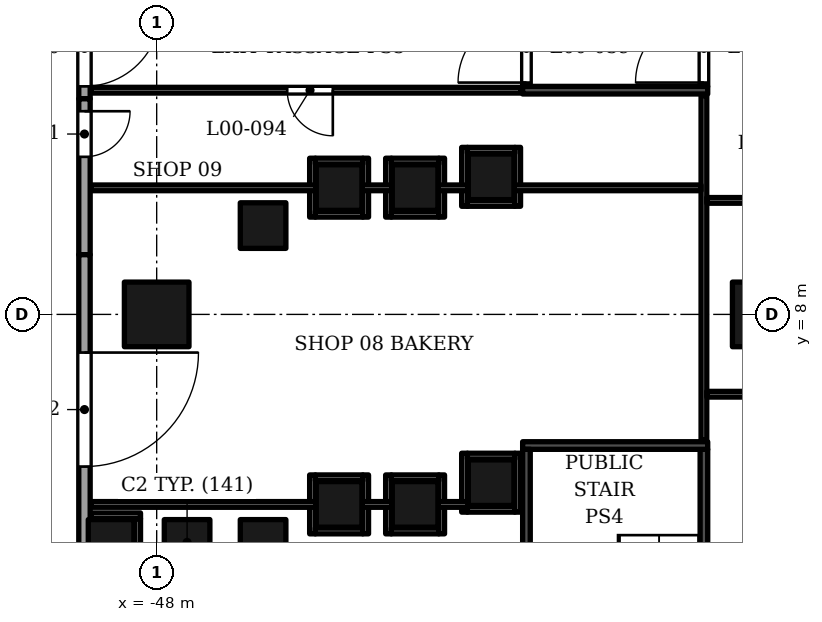
"""IFC4 building model, lengths in metres.
Left out: names, types, materials, properties, quantities, classifications, styles, units other than length and angle.
Written with IfcOpenShell. Run it as: python <this file> out.ifc"""

import sys

from ifc_helpers import new_model, si_unit, direction, frame, frame_2d, origin, origin_2d, place, context, subcontext, project, spatial, rectangle, extrude, element, fill, save


model = new_model("IFC4")
c1 = context("Model", 3, precision=1e-05, world=origin(), true_north=direction((0.0, 1.0)))
c2 = subcontext(c1, "Body", "Model", "MODEL_VIEW")
j1 = project(units=[si_unit("LENGTHUNIT", "METRE"), si_unit("PLANEANGLEUNIT", "RADIAN")], contexts=[c1])
p1 = place(None, origin())
s1 = spatial("IfcSite", under=j1, at=p1, CompositionType="ELEMENT")
p2 = place(p1, origin())
s2 = spatial("IfcBuilding", under=s1, at=p2, CompositionType="ELEMENT")
p3 = place(p2, origin())
s3 = spatial("IfcBuildingStorey", under=s2, at=p3, CompositionType="ELEMENT", Elevation=0.0)
for number, where, z_axis, x_axis in (
    (1, (-48.0, 8.0, 0.0), (0.0, 0.0, 1.0), (1.0, 0.0, 0.0)),
    (2, (-32.0, 8.0, 0.0), (0.0, 0.0, 1.0), (1.0, 0.0, 0.0)),
):
    element("IfcColumn", number, at=place(p3, frame(where, z_axis=z_axis, x_axis=x_axis)), inside=s3, PredefinedType="COLUMN", context=c2, shape_type="SweptSolid", body=[
        extrude(rectangle(XDim=1.7, YDim=1.7, at=origin_2d()), origin(), (0.0, 0.0, 1.0), 9.0),
    ])
for number, where, z_axis, x_axis in (
    (3, (-39.2, 3.572, 0.0), (0.0, 0.0, 1.0), (1.0, 0.0, 0.0)),
    (4, (-39.2, 11.62, 0.0), (0.0, 0.0, 1.0), (1.0, 0.0, 0.0)),
    (5, (-41.2, 3.001, 0.0), (0.0, 0.0, 1.0), (1.0, 0.0, 0.0)),
    (6, (-41.2, 11.337, 0.0), (0.0, 0.0, 1.0), (1.0, 0.0, 0.0)),
    (7, (-43.2, 3.001, 0.0), (0.0, 0.0, 1.0), (1.0, 0.0, 0.0)),
    (8, (-43.2, 11.337, 0.0), (0.0, 0.0, 1.0), (1.0, 0.0, 0.0)),
    (9, (-45.2, 2.001, 0.0), (0.0, 0.0, 1.0), (1.0, 0.0, 0.0)),
    (10, (-45.2, 10.337, 0.0), (0.0, 0.0, 1.0), (1.0, 0.0, 0.0)),
    (11, (-47.2, 2.001, 0.0), (0.0, 0.0, 1.0), (1.0, 0.0, 0.0)),
    (12, (-49.2, 2.001, 0.0), (0.0, 0.0, 1.0), (1.0, 0.0, 0.0)),
):
    element("IfcColumn", number, at=place(p3, frame(where, z_axis=z_axis, x_axis=x_axis)), inside=s3, PredefinedType="COLUMN", context=c2, shape_type="SweptSolid", body=[
        extrude(rectangle(XDim=1.2, YDim=1.2, at=origin_2d()), origin(), (0.0, 0.0, 1.0), 9.0),
    ])
p4 = place(p3, frame((-49.9, 16.4, 0.0), z_axis=(0.0, 0.0, 1.0), x_axis=(0.0, -1.0, 0.0)))
e13 = element("IfcWall", 13, at=p4, inside=s3, PredefinedType="ELEMENTEDWALL", context=c2, shape_type="SweptSolid", body=[
    extrude(rectangle(XDim=2.727, YDim=0.3, at=frame_2d((1.363, 0.0))), origin(), (0.0, 0.0, 1.0), 7.6),
])
p5 = place(p4, frame((0.4, 0.0, 0.0)))
e14 = element("IfcOpeningElement", 14, at=p5, cuts=e13, PredefinedType="OPENING", context=c2, shape_type="SweptSolid", body=[
    extrude(rectangle(XDim=2.0, YDim=2.4, at=frame_2d((1.0, 1.2))), frame((0.0, 0.16, 0.0), z_axis=(0.0, -1.0, 0.0), x_axis=(1.0, 0.0, 0.0)), (0.0, 0.0, 1.0), 0.32),
])
p6 = place(p3, frame((-49.9, 13.673, 0.0), z_axis=(0.0, 0.0, 1.0), x_axis=(0.0, -1.0, 0.0)))
e15 = element("IfcWall", 15, at=p6, inside=s3, PredefinedType="ELEMENTEDWALL", context=c2, shape_type="SweptSolid", body=[
    extrude(rectangle(XDim=4.102, YDim=0.3, at=frame_2d((2.051, 0.0))), origin(), (0.0, 0.0, 1.0), 7.6),
])
p7 = place(p6, frame((0.327, 0.0, 0.0)))
e16 = element("IfcOpeningElement", 16, at=p7, cuts=e15, PredefinedType="OPENING", context=c2, shape_type="SweptSolid", body=[
    extrude(rectangle(XDim=1.2, YDim=2.7, at=frame_2d((0.6, 1.35))), frame((0.0, 0.16, 0.0), z_axis=(0.0, -1.0, 0.0), x_axis=(1.0, 0.0, 0.0)), (0.0, 0.0, 1.0), 0.32),
])
p8 = place(p3, frame((-49.9, 9.571, 0.0), z_axis=(0.0, 0.0, 1.0), x_axis=(0.0, -1.0, 0.0)))
e17 = element("IfcWall", 17, at=p8, inside=s3, PredefinedType="ELEMENTEDWALL", context=c2, shape_type="SweptSolid", body=[
    extrude(rectangle(XDim=7.673, YDim=0.3, at=frame_2d((3.836, 0.0))), origin(), (0.0, 0.0, 1.0), 7.6),
])
p9 = place(p8, frame((2.575, 0.0, 0.0)))
e18 = element("IfcOpeningElement", 18, at=p9, cuts=e17, PredefinedType="OPENING", context=c2, shape_type="SweptSolid", body=[
    extrude(rectangle(XDim=3.0, YDim=2.7, at=frame_2d((1.5, 1.35))), frame((0.0, 0.16, 0.0), z_axis=(0.0, -1.0, 0.0), x_axis=(1.0, 0.0, 0.0)), (0.0, 0.0, 1.0), 0.32),
])
for number, where, z_axis, x_axis in (
    (19, (-49.85, 18.79, 9.0), (0.0, 0.0, 1.0), (0.0, -1.0, 0.0)),
    (20, (-49.85, 4.093, 9.0), (0.0, 0.0, 1.0), (0.0, -1.0, 0.0)),
):
    element("IfcWall", number, at=place(p3, frame(where, z_axis=z_axis, x_axis=x_axis)), inside=s3, PredefinedType="PARAPET", context=c2, shape_type="SweptSolid", body=[
        extrude(rectangle(XDim=14.698, YDim=0.3, at=frame_2d((7.349, 0.0))), origin(), (0.0, 0.0, 1.0), 1.1),
    ])
p10 = place(p3, frame((-38.37, 4.55, 0.0), z_axis=(0.0, 0.0, 1.0), x_axis=(1.0, 0.0, 0.0)))
e21 = element("IfcWall", 21, at=p10, inside=s3, PredefinedType="SOLIDWALL", context=c2, shape_type="SweptSolid", body=[
    extrude(rectangle(XDim=4.87, YDim=0.2, at=frame_2d((2.435, 0.0))), origin(), (0.0, 0.0, 1.0), 8.5),
])
p11 = place(p3, frame((-38.27, -2.2, 0.0), z_axis=(0.0, 0.0, 1.0), x_axis=(0.0, 1.0, 0.0)))
e22 = element("IfcWall", 22, at=p11, inside=s3, PredefinedType="SOLIDWALL", context=c2, shape_type="SweptSolid", body=[
    extrude(rectangle(XDim=6.65, YDim=0.2, at=frame_2d((3.325, 0.0))), origin(), (0.0, 0.0, 1.0), 8.5),
])
p12 = place(p11, frame((0.1, 0.0, 0.0)))
e23 = element("IfcOpeningElement", 23, at=p12, cuts=e22, PredefinedType="OPENING", context=c2, shape_type="SweptSolid", body=[
    extrude(rectangle(XDim=1.8, YDim=2.4, at=frame_2d((0.9, 1.2))), frame((0.0, 0.11, 0.0), z_axis=(0.0, -1.0, 0.0), x_axis=(1.0, 0.0, 0.0)), (0.0, 0.0, 1.0), 0.22),
])
p13 = place(p3, frame((-33.6, -2.2, 0.0), z_axis=(0.0, 0.0, 1.0), x_axis=(0.0, 1.0, 0.0)))
e24 = element("IfcWall", 24, at=p13, inside=s3, PredefinedType="SOLIDWALL", context=c2, shape_type="SweptSolid", body=[
    extrude(rectangle(XDim=6.65, YDim=0.2, at=frame_2d((3.325, 0.0))), origin(), (0.0, 0.0, 1.0), 8.5),
])
p14 = place(p13, frame((0.1, 0.0, 0.0)))
e25 = element("IfcOpeningElement", 25, at=p14, cuts=e24, PredefinedType="OPENING", context=c2, shape_type="SweptSolid", body=[
    extrude(rectangle(XDim=1.8, YDim=2.4, at=frame_2d((0.9, 1.2))), frame((0.0, 0.11, 0.0), z_axis=(0.0, -1.0, 0.0), x_axis=(1.0, 0.0, 0.0)), (0.0, 0.0, 1.0), 0.22),
])
p15 = place(p3, frame((-38.37, 13.9, 0.0), z_axis=(0.0, 0.0, 1.0), x_axis=(1.0, 0.0, 0.0)))
e26 = element("IfcWall", 26, at=p15, inside=s3, PredefinedType="SOLIDWALL", context=c2, shape_type="SweptSolid", body=[
    extrude(rectangle(XDim=4.87, YDim=0.2, at=frame_2d((2.435, 0.0))), origin(), (0.0, 0.0, 1.0), 8.5),
])
p16 = place(p3, frame((-38.27, 14.0, 0.0), z_axis=(0.0, 0.0, 1.0), x_axis=(0.0, 1.0, 0.0)))
e27 = element("IfcWall", 27, at=p16, inside=s3, PredefinedType="SOLIDWALL", context=c2, shape_type="SweptSolid", body=[
    extrude(rectangle(XDim=6.65, YDim=0.2, at=frame_2d((3.325, 0.0))), origin(), (0.0, 0.0, 1.0), 8.5),
])
p17 = place(p16, frame((0.1, 0.0, 0.0)))
e28 = element("IfcOpeningElement", 28, at=p17, cuts=e27, PredefinedType="OPENING", context=c2, shape_type="SweptSolid", body=[
    extrude(rectangle(XDim=1.8, YDim=2.4, at=frame_2d((0.9, 1.2))), frame((0.0, 0.11, 0.0), z_axis=(0.0, -1.0, 0.0), x_axis=(1.0, 0.0, 0.0)), (0.0, 0.0, 1.0), 0.22),
])
p18 = place(p3, frame((-33.6, 14.0, 0.0), z_axis=(0.0, 0.0, 1.0), x_axis=(0.0, 1.0, 0.0)))
e29 = element("IfcWall", 29, at=p18, inside=s3, PredefinedType="SOLIDWALL", context=c2, shape_type="SweptSolid", body=[
    extrude(rectangle(XDim=6.65, YDim=0.2, at=frame_2d((3.325, 0.0))), origin(), (0.0, 0.0, 1.0), 8.5),
])
p19 = place(p18, frame((0.1, 0.0, 0.0)))
e30 = element("IfcOpeningElement", 30, at=p19, cuts=e29, PredefinedType="OPENING", context=c2, shape_type="SweptSolid", body=[
    extrude(rectangle(XDim=1.8, YDim=2.4, at=frame_2d((0.9, 1.2))), frame((0.0, 0.11, 0.0), z_axis=(0.0, -1.0, 0.0), x_axis=(1.0, 0.0, 0.0)), (0.0, 0.0, 1.0), 0.22),
])
p20 = place(p3, frame((-48.5, 1.376, 0.0), z_axis=(0.0, 0.0, 1.0), x_axis=(0.0, 1.0, 0.0)))
e31 = element("IfcWall", 31, at=p20, inside=s3, PredefinedType="PARTITIONING", context=c2, shape_type="SweptSolid", body=[
    extrude(rectangle(XDim=1.25, YDim=0.15, at=frame_2d((0.625, 0.0))), origin(), (0.0, 0.0, 1.0), 8.5),
])
p21 = place(p3, frame((-43.9, 2.226, 0.0), z_axis=(0.0, 0.0, 1.0), x_axis=(0.0, 1.0, 0.0)))
e32 = element("IfcWall", 32, at=p21, inside=s3, PredefinedType="PARTITIONING", context=c2, shape_type="SweptSolid", body=[
    extrude(rectangle(XDim=1.55, YDim=0.15, at=frame_2d((0.775, 0.0))), origin(), (0.0, 0.0, 1.0), 8.5),
])
p22 = place(p3, frame((-43.825, 2.301, 0.0), z_axis=(0.0, 0.0, 1.0), x_axis=(1.0, 0.0, 0.0)))
e33 = element("IfcWall", 33, at=p22, inside=s3, PredefinedType="PARTITIONING", context=c2, shape_type="SweptSolid", body=[
    extrude(rectangle(XDim=1.25, YDim=0.15, at=frame_2d((0.625, 0.0))), origin(), (0.0, 0.0, 1.0), 8.5),
])
for number, where, z_axis, x_axis in (
    (34, (-42.5, 2.226, 0.0), (0.0, 0.0, 1.0), (0.0, 1.0, 0.0)),
    (35, (-41.9, 2.226, 0.0), (0.0, 0.0, 1.0), (0.0, 1.0, 0.0)),
):
    element("IfcWall", number, at=place(p3, frame(where, z_axis=z_axis, x_axis=x_axis)), inside=s3, PredefinedType="PARTITIONING", context=c2, shape_type="SweptSolid", body=[
        extrude(rectangle(XDim=1.55, YDim=0.15, at=frame_2d((0.775, 0.0))), origin(), (0.0, 0.0, 1.0), 8.5),
    ])
p23 = place(p3, frame((-41.825, 2.301, 0.0), z_axis=(0.0, 0.0, 1.0), x_axis=(1.0, 0.0, 0.0)))
e36 = element("IfcWall", 36, at=p23, inside=s3, PredefinedType="PARTITIONING", context=c2, shape_type="SweptSolid", body=[
    extrude(rectangle(XDim=1.25, YDim=0.15, at=frame_2d((0.625, 0.0))), origin(), (0.0, 0.0, 1.0), 8.5),
])
p24 = place(p3, frame((-40.5, 2.226, 0.0), z_axis=(0.0, 0.0, 1.0), x_axis=(0.0, 1.0, 0.0)))
e37 = element("IfcWall", 37, at=p24, inside=s3, PredefinedType="PARTITIONING", context=c2, shape_type="SweptSolid", body=[
    extrude(rectangle(XDim=1.55, YDim=0.15, at=frame_2d((0.775, 0.0))), origin(), (0.0, 0.0, 1.0), 8.5),
])
p25 = place(p3, frame((-49.72, 2.701, 0.0), z_axis=(0.0, 0.0, 1.0), x_axis=(1.0, 0.0, 0.0)))
e38 = element("IfcWall", 38, at=p25, inside=s3, PredefinedType="PARTITIONING", context=c2, shape_type="SweptSolid", body=[
    extrude(rectangle(XDim=1.295, YDim=0.15, at=frame_2d((0.647, 0.0))), origin(), (0.0, 0.0, 1.0), 8.5),
])
p26 = place(p3, frame((-39.9, 2.797, 0.0), z_axis=(0.0, 0.0, 1.0), x_axis=(0.0, 1.0, 0.0)))
e39 = element("IfcWall", 39, at=p26, inside=s3, PredefinedType="PARTITIONING", context=c2, shape_type="SweptSolid", body=[
    extrude(rectangle(XDim=1.55, YDim=0.15, at=frame_2d((0.775, 0.0))), origin(), (0.0, 0.0, 1.0), 8.5),
])
p27 = place(p3, frame((-39.825, 2.872, 0.0), z_axis=(0.0, 0.0, 1.0), x_axis=(1.0, 0.0, 0.0)))
e40 = element("IfcWall", 40, at=p27, inside=s3, PredefinedType="PARTITIONING", context=c2, shape_type="SweptSolid", body=[
    extrude(rectangle(XDim=1.25, YDim=0.15, at=frame_2d((0.625, 0.0))), origin(), (0.0, 0.0, 1.0), 8.5),
])
p28 = place(p3, frame((-38.5, 2.797, 0.0), z_axis=(0.0, 0.0, 1.0), x_axis=(0.0, 1.0, 0.0)))
e41 = element("IfcWall", 41, at=p28, inside=s3, PredefinedType="PARTITIONING", context=c2, shape_type="SweptSolid", body=[
    extrude(rectangle(XDim=1.55, YDim=0.15, at=frame_2d((0.775, 0.0))), origin(), (0.0, 0.0, 1.0), 8.5),
])
p29 = place(p3, frame((-49.72, 3.0, 0.0), z_axis=(0.0, 0.0, 1.0), x_axis=(1.0, 0.0, 0.0)))
e42 = element("IfcWall", 42, at=p29, inside=s3, PredefinedType="PARTITIONING", context=c2, shape_type="SweptSolid", body=[
    extrude(rectangle(XDim=5.92, YDim=0.15, at=frame_2d((2.96, 0.0))), origin(), (0.0, 0.0, 1.0), 7.6),
])
for number, where, z_axis, x_axis in (
    (43, (-42.6, 3.0, 0.0), (0.0, 0.0, 1.0), (1.0, 0.0, 0.0)),
    (44, (-40.6, 3.0, 0.0), (0.0, 0.0, 1.0), (1.0, 0.0, 0.0)),
):
    element("IfcWall", number, at=place(p3, frame(where, z_axis=z_axis, x_axis=x_axis)), inside=s3, PredefinedType="PARTITIONING", context=c2, shape_type="SweptSolid", body=[
        extrude(rectangle(XDim=0.8, YDim=0.15, at=frame_2d((0.4, 0.0))), origin(), (0.0, 0.0, 1.0), 8.5),
    ])
for number, where, z_axis, x_axis in (
    (45, (-43.825, 3.701, 0.0), (0.0, 0.0, 1.0), (1.0, 0.0, 0.0)),
    (46, (-41.825, 3.701, 0.0), (0.0, 0.0, 1.0), (1.0, 0.0, 0.0)),
    (47, (-39.825, 4.272, 0.0), (0.0, 0.0, 1.0), (1.0, 0.0, 0.0)),
):
    element("IfcWall", number, at=place(p3, frame(where, z_axis=z_axis, x_axis=x_axis)), inside=s3, PredefinedType="PARTITIONING", context=c2, shape_type="SweptSolid", body=[
        extrude(rectangle(XDim=1.25, YDim=0.15, at=frame_2d((0.625, 0.0))), origin(), (0.0, 0.0, 1.0), 8.5),
    ])
p30 = place(p3, frame((-33.6, 4.69, 0.0), z_axis=(0.0, 0.0, 1.0), x_axis=(0.0, 1.0, 0.0)))
e48 = element("IfcWall", 48, at=p30, inside=s3, PredefinedType="PARTITIONING", context=c2, shape_type="SweptSolid", body=[
    extrude(rectangle(XDim=9.07, YDim=0.15, at=frame_2d((4.535, 0.0))), origin(), (0.0, 0.0, 1.0), 7.3),
])
p31 = place(p3, frame((-33.525, 5.9, 0.0), z_axis=(0.0, 0.0, 1.0), x_axis=(1.0, 0.0, 0.0)))
e49 = element("IfcWall", 49, at=p31, inside=s3, PredefinedType="PARTITIONING", context=c2, shape_type="SweptSolid", body=[
    extrude(rectangle(XDim=3.85, YDim=0.15, at=frame_2d((1.925, 0.0))), origin(), (0.0, 0.0, 1.0), 7.3),
])
p32 = place(p3, frame((-43.9, 10.56, 0.0), z_axis=(0.0, 0.0, 1.0), x_axis=(0.0, 1.0, 0.0)))
e50 = element("IfcWall", 50, at=p32, inside=s3, PredefinedType="PARTITIONING", context=c2, shape_type="SweptSolid", body=[
    extrude(rectangle(XDim=1.55, YDim=0.15, at=frame_2d((0.775, 0.0))), origin(), (0.0, 0.0, 1.0), 8.5),
])
p33 = place(p3, frame((-43.825, 10.635, 0.0), z_axis=(0.0, 0.0, 1.0), x_axis=(1.0, 0.0, 0.0)))
e51 = element("IfcWall", 51, at=p33, inside=s3, PredefinedType="PARTITIONING", context=c2, shape_type="SweptSolid", body=[
    extrude(rectangle(XDim=1.25, YDim=0.15, at=frame_2d((0.625, 0.0))), origin(), (0.0, 0.0, 1.0), 8.5),
])
for number, where, z_axis, x_axis in (
    (52, (-42.5, 10.56, 0.0), (0.0, 0.0, 1.0), (0.0, 1.0, 0.0)),
    (53, (-41.9, 10.56, 0.0), (0.0, 0.0, 1.0), (0.0, 1.0, 0.0)),
):
    element("IfcWall", number, at=place(p3, frame(where, z_axis=z_axis, x_axis=x_axis)), inside=s3, PredefinedType="PARTITIONING", context=c2, shape_type="SweptSolid", body=[
        extrude(rectangle(XDim=1.55, YDim=0.15, at=frame_2d((0.775, 0.0))), origin(), (0.0, 0.0, 1.0), 8.5),
    ])
p34 = place(p3, frame((-41.825, 10.635, 0.0), z_axis=(0.0, 0.0, 1.0), x_axis=(1.0, 0.0, 0.0)))
e54 = element("IfcWall", 54, at=p34, inside=s3, PredefinedType="PARTITIONING", context=c2, shape_type="SweptSolid", body=[
    extrude(rectangle(XDim=1.25, YDim=0.15, at=frame_2d((0.625, 0.0))), origin(), (0.0, 0.0, 1.0), 8.5),
])
for number, where, z_axis, x_axis in (
    (55, (-40.5, 10.56, 0.0), (0.0, 0.0, 1.0), (0.0, 1.0, 0.0)),
    (56, (-39.9, 10.845, 0.0), (0.0, 0.0, 1.0), (0.0, 1.0, 0.0)),
):
    element("IfcWall", number, at=place(p3, frame(where, z_axis=z_axis, x_axis=x_axis)), inside=s3, PredefinedType="PARTITIONING", context=c2, shape_type="SweptSolid", body=[
        extrude(rectangle(XDim=1.55, YDim=0.15, at=frame_2d((0.775, 0.0))), origin(), (0.0, 0.0, 1.0), 8.5),
    ])
p35 = place(p3, frame((-39.825, 10.92, 0.0), z_axis=(0.0, 0.0, 1.0), x_axis=(1.0, 0.0, 0.0)))
e57 = element("IfcWall", 57, at=p35, inside=s3, PredefinedType="PARTITIONING", context=c2, shape_type="SweptSolid", body=[
    extrude(rectangle(XDim=1.25, YDim=0.15, at=frame_2d((0.625, 0.0))), origin(), (0.0, 0.0, 1.0), 8.5),
])
p36 = place(p3, frame((-38.5, 10.845, 0.0), z_axis=(0.0, 0.0, 1.0), x_axis=(0.0, 1.0, 0.0)))
e58 = element("IfcWall", 58, at=p36, inside=s3, PredefinedType="PARTITIONING", context=c2, shape_type="SweptSolid", body=[
    extrude(rectangle(XDim=1.55, YDim=0.15, at=frame_2d((0.775, 0.0))), origin(), (0.0, 0.0, 1.0), 8.5),
])
p37 = place(p3, frame((-33.525, 11.0, 0.0), z_axis=(0.0, 0.0, 1.0), x_axis=(1.0, 0.0, 0.0)))
e59 = element("IfcWall", 59, at=p37, inside=s3, PredefinedType="PARTITIONING", context=c2, shape_type="SweptSolid", body=[
    extrude(rectangle(XDim=3.85, YDim=0.15, at=frame_2d((1.925, 0.0))), origin(), (0.0, 0.0, 1.0), 7.3),
])
p38 = place(p37, frame((1.425, 0.0, 0.0)))
e60 = element("IfcOpeningElement", 60, at=p38, cuts=e59, PredefinedType="OPENING", context=c2, shape_type="SweptSolid", body=[
    extrude(rectangle(XDim=0.9, YDim=2.1, at=frame_2d((0.45, 1.05))), frame((0.0, 0.085, 0.0), z_axis=(0.0, -1.0, 0.0), x_axis=(1.0, 0.0, 0.0)), (0.0, 0.0, 1.0), 0.17),
])
p39 = place(p3, frame((-49.72, 11.33, 0.0), z_axis=(0.0, 0.0, 1.0), x_axis=(1.0, 0.0, 0.0)))
e61 = element("IfcWall", 61, at=p39, inside=s3, PredefinedType="PARTITIONING", context=c2, shape_type="SweptSolid", body=[
    extrude(rectangle(XDim=5.92, YDim=0.15, at=frame_2d((2.96, 0.0))), origin(), (0.0, 0.0, 1.0), 7.6),
])
for number, where, z_axis, x_axis in (
    (62, (-42.6, 11.33, 0.0), (0.0, 0.0, 1.0), (1.0, 0.0, 0.0)),
    (63, (-40.6, 11.33, 0.0), (0.0, 0.0, 1.0), (1.0, 0.0, 0.0)),
):
    element("IfcWall", number, at=place(p3, frame(where, z_axis=z_axis, x_axis=x_axis)), inside=s3, PredefinedType="PARTITIONING", context=c2, shape_type="SweptSolid", body=[
        extrude(rectangle(XDim=0.8, YDim=0.15, at=frame_2d((0.4, 0.0))), origin(), (0.0, 0.0, 1.0), 8.5),
    ])
p40 = place(p3, frame((-38.6, 11.33, 0.0), z_axis=(0.0, 0.0, 1.0), x_axis=(1.0, 0.0, 0.0)))
e64 = element("IfcWall", 64, at=p40, inside=s3, PredefinedType="PARTITIONING", context=c2, shape_type="SweptSolid", body=[
    extrude(rectangle(XDim=4.925, YDim=0.15, at=frame_2d((2.462, 0.0))), origin(), (0.0, 0.0, 1.0), 8.5),
])
for number, where, z_axis, x_axis in (
    (65, (-43.825, 12.035, 0.0), (0.0, 0.0, 1.0), (1.0, 0.0, 0.0)),
    (66, (-41.825, 12.035, 0.0), (0.0, 0.0, 1.0), (1.0, 0.0, 0.0)),
    (67, (-39.825, 12.32, 0.0), (0.0, 0.0, 1.0), (1.0, 0.0, 0.0)),
):
    element("IfcWall", number, at=place(p3, frame(where, z_axis=z_axis, x_axis=x_axis)), inside=s3, PredefinedType="PARTITIONING", context=c2, shape_type="SweptSolid", body=[
        extrude(rectangle(XDim=1.25, YDim=0.15, at=frame_2d((0.625, 0.0))), origin(), (0.0, 0.0, 1.0), 8.5),
    ])
p41 = place(p3, frame((-49.72, 13.899, 0.0), z_axis=(0.0, 0.0, 1.0), x_axis=(1.0, 0.0, 0.0)))
e68 = element("IfcWall", 68, at=p41, inside=s3, PredefinedType="PARTITIONING", context=c2, shape_type="SweptSolid", body=[
    extrude(rectangle(XDim=11.31, YDim=0.151, at=frame_2d((5.655, 0.0))), origin(), (0.0, 0.0, 1.0), 7.6),
])
p42 = place(p41, frame((5.155, 0.0, 0.0)))
e69 = element("IfcOpeningElement", 69, at=p42, cuts=e68, PredefinedType="OPENING", context=c2, shape_type="SweptSolid", body=[
    extrude(rectangle(XDim=1.2, YDim=2.1, at=frame_2d((0.6, 1.05))), frame((0.0, 0.085, 0.0), z_axis=(0.0, -1.0, 0.0), x_axis=(1.0, 0.0, 0.0)), (0.0, 0.0, 1.0), 0.171),
])
p43 = place(p5, origin())
e70 = element("IfcDoor", 70, at=p43, inside=s3, OperationType="DOUBLE_DOOR_SINGLE_SWING", PredefinedType="DOOR", context=c2, shape_type="SweptSolid", body=[
    extrude(rectangle(XDim=2.0, YDim=2.4, at=frame_2d((1.0, 1.2))), frame((0.0, 0.025, 0.0), z_axis=(0.0, -1.0, 0.0), x_axis=(1.0, 0.0, 0.0)), (0.0, 0.0, 1.0), 0.05),
])
fill(e14, e70)
p44 = place(p7, origin())
e71 = element("IfcDoor", 71, at=p44, inside=s3, OperationType="DOUBLE_DOOR_SINGLE_SWING", PredefinedType="DOOR", context=c2, shape_type="SweptSolid", body=[
    extrude(rectangle(XDim=1.2, YDim=2.7, at=frame_2d((0.6, 1.35))), frame((0.0, 0.025, 0.0), z_axis=(0.0, -1.0, 0.0), x_axis=(1.0, 0.0, 0.0)), (0.0, 0.0, 1.0), 0.05),
])
fill(e16, e71)
p45 = place(p9, origin())
e72 = element("IfcDoor", 72, at=p45, inside=s3, OperationType="DOUBLE_DOOR_SINGLE_SWING", PredefinedType="DOOR", context=c2, shape_type="SweptSolid", body=[
    extrude(rectangle(XDim=3.0, YDim=2.7, at=frame_2d((1.5, 1.35))), frame((0.0, 0.025, 0.0), z_axis=(0.0, -1.0, 0.0), x_axis=(1.0, 0.0, 0.0)), (0.0, 0.0, 1.0), 0.05),
])
fill(e18, e72)
p46 = place(p19, origin())
e73 = element("IfcDoor", 73, at=p46, inside=s3, OperationType="DOUBLE_DOOR_SINGLE_SWING", PredefinedType="DOOR", context=c2, shape_type="SweptSolid", body=[
    extrude(rectangle(XDim=1.8, YDim=2.4, at=frame_2d((0.9, 1.2))), frame((0.0, 0.025, 0.0), z_axis=(0.0, -1.0, 0.0), x_axis=(1.0, 0.0, 0.0)), (0.0, 0.0, 1.0), 0.05),
])
fill(e30, e73)
p47 = place(p17, origin())
e74 = element("IfcDoor", 74, at=p47, inside=s3, OperationType="DOUBLE_DOOR_SINGLE_SWING", PredefinedType="DOOR", context=c2, shape_type="SweptSolid", body=[
    extrude(rectangle(XDim=1.8, YDim=2.4, at=frame_2d((0.9, 1.2))), frame((0.0, 0.025, 0.0), z_axis=(0.0, -1.0, 0.0), x_axis=(1.0, 0.0, 0.0)), (0.0, 0.0, 1.0), 0.05),
])
fill(e28, e74)
p48 = place(p42, origin())
e75 = element("IfcDoor", 75, at=p48, inside=s3, OperationType="SINGLE_SWING_RIGHT", PredefinedType="DOOR", context=c2, shape_type="SweptSolid", body=[
    extrude(rectangle(XDim=1.2, YDim=2.1, at=frame_2d((0.6, 1.05))), frame((0.0, 0.025, 0.0), z_axis=(0.0, -1.0, 0.0), x_axis=(1.0, 0.0, 0.0)), (0.0, 0.0, 1.0), 0.05),
])
fill(e69, e75)
save(model, sys.argv[1])
